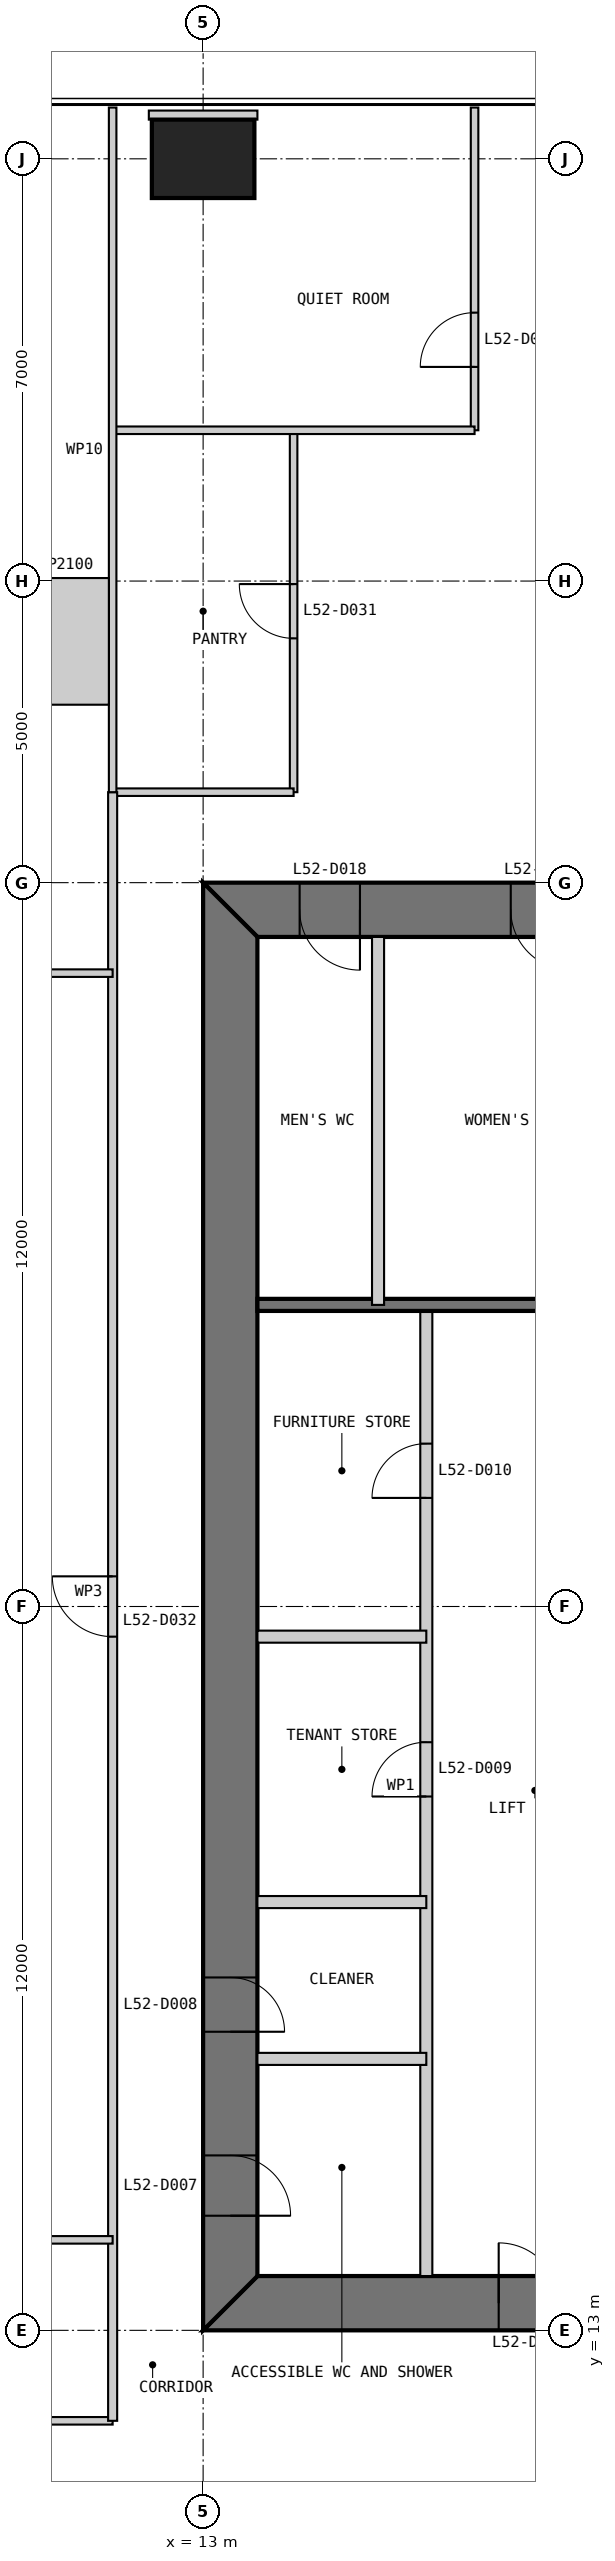
"""IFC4 building model, lengths in metres.
Left out: names, types, materials, properties, quantities, classifications, styles, units other than length and angle.
Written with IfcOpenShell. Run it as: python <this file> out.ifc"""

import sys

from ifc_helpers import new_model, si_unit, direction, frame, frame_2d, origin, origin_2d, place, context, subcontext, project, spatial, polyline, rectangle, outline, extrude, element, fill, save


model = new_model("IFC4")
c1 = context("Model", 3, precision=1e-05, world=origin(), true_north=direction((0.0, 1.0)))
c2 = subcontext(c1, "Body", "Model", "MODEL_VIEW")
j1 = project(units=[si_unit("LENGTHUNIT", "METRE"), si_unit("PLANEANGLEUNIT", "RADIAN")], contexts=[c1])
p1 = place(None, origin())
s1 = spatial("IfcSite", under=j1, at=p1, CompositionType="ELEMENT")
p2 = place(p1, origin())
s2 = spatial("IfcBuilding", under=s1, at=p2, CompositionType="ELEMENT")
p3 = place(p2, frame((0.0, 0.0, 221.8)))
s3 = spatial("IfcBuildingStorey", under=s2, at=p3, CompositionType="ELEMENT", Elevation=221.8)
p4 = place(p3, frame((13.0, 49.0, 0.0), z_axis=(0.0, 0.0, 1.0), x_axis=(1.0, 0.0, 0.0)))
e1 = element("IfcColumn", 1, at=p4, inside=s3, PredefinedType="COLUMN", context=c2, shape_type="SweptSolid", body=[
    extrude(rectangle(XDim=1.7, YDim=1.3, at=origin_2d()), origin(), (0.0, 0.0, 1.0), 4.0),
])
p5 = place(p3, frame((13.0, 13.45, 0.0), z_axis=(0.0, 0.0, 1.0), x_axis=(1.0, 0.0, 0.0)))
e2 = element("IfcWall", 2, at=p5, inside=s3, PredefinedType="SHEAR", context=c2, shape_type="SweptSolid", body=[
    extrude(outline(polyline([(0.0, -0.45), (24.0, -0.45), (23.1, 0.45), (0.9, 0.45), (0.0, -0.45)])), origin(), (0.0, 0.0, 1.0), 4.0),
])
p6 = place(p5, frame((4.9, 0.0, 0.0)))
e3 = element("IfcOpeningElement", 3, at=p6, cuts=e2, PredefinedType="OPENING", context=c2, shape_type="SweptSolid", body=[
    extrude(rectangle(XDim=1.0, YDim=2.2, at=frame_2d((0.5, 1.1))), frame((0.0, 0.46, 0.0), z_axis=(0.0, -1.0, 0.0), x_axis=(1.0, 0.0, 0.0)), (0.0, 0.0, 1.0), 0.92),
])
p7 = place(p5, frame((8.9, 0.0, 0.0)))
e4 = element("IfcOpeningElement", 4, at=p7, cuts=e2, PredefinedType="OPENING", context=c2, shape_type="SweptSolid", body=[
    extrude(rectangle(XDim=1.1, YDim=2.2, at=frame_2d((0.55, 1.1))), frame((0.0, 0.46, 0.0), z_axis=(0.0, -1.0, 0.0), x_axis=(1.0, 0.0, 0.0)), (0.0, 0.0, 1.0), 0.92),
])
p8 = place(p5, frame((15.05, 0.0, 0.0)))
e5 = element("IfcOpeningElement", 5, at=p8, cuts=e2, PredefinedType="OPENING", context=c2, shape_type="SweptSolid", body=[
    extrude(rectangle(XDim=0.9, YDim=2.2, at=frame_2d((0.45, 1.1))), frame((0.0, 0.46, 0.0), z_axis=(0.0, -1.0, 0.0), x_axis=(1.0, 0.0, 0.0)), (0.0, 0.0, 1.0), 0.92),
])
p9 = place(p5, frame((17.9, 0.0, 0.0)))
e6 = element("IfcOpeningElement", 6, at=p9, cuts=e2, PredefinedType="OPENING", context=c2, shape_type="SweptSolid", body=[
    extrude(rectangle(XDim=1.0, YDim=2.2, at=frame_2d((0.5, 1.1))), frame((0.0, 0.46, 0.0), z_axis=(0.0, -1.0, 0.0), x_axis=(1.0, 0.0, 0.0)), (0.0, 0.0, 1.0), 0.92),
])
p10 = place(p5, frame((21.4, 0.0, 0.0)))
e7 = element("IfcOpeningElement", 7, at=p10, cuts=e2, PredefinedType="OPENING", context=c2, shape_type="SweptSolid", body=[
    extrude(rectangle(XDim=1.0, YDim=2.2, at=frame_2d((0.5, 1.1))), frame((0.0, 0.46, 0.0), z_axis=(0.0, -1.0, 0.0), x_axis=(1.0, 0.0, 0.0)), (0.0, 0.0, 1.0), 0.92),
])
p11 = place(p3, frame((37.0, 36.55, 0.0), z_axis=(0.0, 0.0, 1.0), x_axis=(-1.0, 0.0, 0.0)))
e8 = element("IfcWall", 8, at=p11, inside=s3, PredefinedType="SHEAR", context=c2, shape_type="SweptSolid", body=[
    extrude(outline(polyline([(0.0, -0.45), (24.0, -0.45), (23.1, 0.45), (0.9, 0.45), (0.0, -0.45)])), origin(), (0.0, 0.0, 1.0), 4.0),
])
p12 = place(p11, frame((4.9, 0.0, 0.0)))
e9 = element("IfcOpeningElement", 9, at=p12, cuts=e8, PredefinedType="OPENING", context=c2, shape_type="SweptSolid", body=[
    extrude(rectangle(XDim=1.0, YDim=2.2, at=frame_2d((0.5, 1.1))), frame((0.0, 0.46, 0.0), z_axis=(0.0, -1.0, 0.0), x_axis=(1.0, 0.0, 0.0)), (0.0, 0.0, 1.0), 0.92),
])
p13 = place(p11, frame((8.9, 0.0, 0.0)))
e10 = element("IfcOpeningElement", 10, at=p13, cuts=e8, PredefinedType="OPENING", context=c2, shape_type="SweptSolid", body=[
    extrude(rectangle(XDim=1.1, YDim=2.2, at=frame_2d((0.55, 1.1))), frame((0.0, 0.46, 0.0), z_axis=(0.0, -1.0, 0.0), x_axis=(1.0, 0.0, 0.0)), (0.0, 0.0, 1.0), 0.92),
])
p14 = place(p11, frame((15.05, 0.0, 0.0)))
e11 = element("IfcOpeningElement", 11, at=p14, cuts=e8, PredefinedType="OPENING", context=c2, shape_type="SweptSolid", body=[
    extrude(rectangle(XDim=0.9, YDim=2.2, at=frame_2d((0.45, 1.1))), frame((0.0, 0.46, 0.0), z_axis=(0.0, -1.0, 0.0), x_axis=(1.0, 0.0, 0.0)), (0.0, 0.0, 1.0), 0.92),
])
p15 = place(p11, frame((17.9, 0.0, 0.0)))
e12 = element("IfcOpeningElement", 12, at=p15, cuts=e8, PredefinedType="OPENING", context=c2, shape_type="SweptSolid", body=[
    extrude(rectangle(XDim=1.0, YDim=2.2, at=frame_2d((0.5, 1.1))), frame((0.0, 0.46, 0.0), z_axis=(0.0, -1.0, 0.0), x_axis=(1.0, 0.0, 0.0)), (0.0, 0.0, 1.0), 0.92),
])
p16 = place(p11, frame((21.4, 0.0, 0.0)))
e13 = element("IfcOpeningElement", 13, at=p16, cuts=e8, PredefinedType="OPENING", context=c2, shape_type="SweptSolid", body=[
    extrude(rectangle(XDim=1.0, YDim=2.2, at=frame_2d((0.5, 1.1))), frame((0.0, 0.46, 0.0), z_axis=(0.0, -1.0, 0.0), x_axis=(1.0, 0.0, 0.0)), (0.0, 0.0, 1.0), 0.92),
])
p17 = place(p3, frame((13.45, 36.1, 0.0), z_axis=(0.0, 0.0, 1.0), x_axis=(0.0, -1.0, 0.0)))
e14 = element("IfcWall", 14, at=p17, inside=s3, PredefinedType="SHEAR", context=c2, shape_type="SweptSolid", body=[
    extrude(outline(polyline([(-0.9, -0.45), (23.1, -0.45), (22.2, 0.45), (0.0, 0.45), (-0.9, -0.45)])), origin(), (0.0, 0.0, 1.0), 4.0),
])
p18 = place(p17, frame((20.2, 0.0, 0.0)))
e15 = element("IfcOpeningElement", 15, at=p18, cuts=e14, PredefinedType="OPENING", context=c2, shape_type="SweptSolid", body=[
    extrude(rectangle(XDim=1.0, YDim=2.2, at=frame_2d((0.5, 1.1))), frame((0.0, 0.46, 0.0), z_axis=(0.0, -1.0, 0.0), x_axis=(1.0, 0.0, 0.0)), (0.0, 0.0, 1.0), 0.92),
])
p19 = place(p17, frame((17.25, 0.0, 0.0)))
e16 = element("IfcOpeningElement", 16, at=p19, cuts=e14, PredefinedType="OPENING", context=c2, shape_type="SweptSolid", body=[
    extrude(rectangle(XDim=0.9, YDim=2.2, at=frame_2d((0.45, 1.1))), frame((0.0, 0.46, 0.0), z_axis=(0.0, -1.0, 0.0), x_axis=(1.0, 0.0, 0.0)), (0.0, 0.0, 1.0), 0.92),
])
p20 = place(p3, frame((16.7, 13.9, 0.0), z_axis=(0.0, 0.0, 1.0), x_axis=(0.0, 1.0, 0.0)))
e17 = element("IfcWall", 17, at=p20, inside=s3, PredefinedType="PARTITIONING", context=c2, shape_type="SweptSolid", body=[
    extrude(rectangle(XDim=16.1, YDim=0.2, at=frame_2d((8.05, 0.0))), origin(), (0.0, 0.0, 1.0), 3.8),
])
p21 = place(p20, frame((7.95, 0.0, 0.0)))
e18 = element("IfcOpeningElement", 18, at=p21, cuts=e17, PredefinedType="OPENING", context=c2, shape_type="SweptSolid", body=[
    extrude(rectangle(XDim=0.9, YDim=2.2, at=frame_2d((0.45, 1.1))), frame((0.0, 0.11, 0.0), z_axis=(0.0, -1.0, 0.0), x_axis=(1.0, 0.0, 0.0)), (0.0, 0.0, 1.0), 0.22),
])
p22 = place(p20, frame((12.9, 0.0, 0.0)))
e19 = element("IfcOpeningElement", 19, at=p22, cuts=e17, PredefinedType="OPENING", context=c2, shape_type="SweptSolid", body=[
    extrude(rectangle(XDim=0.9, YDim=2.2, at=frame_2d((0.45, 1.1))), frame((0.0, 0.11, 0.0), z_axis=(0.0, -1.0, 0.0), x_axis=(1.0, 0.0, 0.0)), (0.0, 0.0, 1.0), 0.22),
])
for number, where, z_axis, x_axis in (
    (20, (13.9, 17.5, 0.0), (0.0, 0.0, 1.0), (1.0, 0.0, 0.0)),
    (21, (13.9, 20.1, 0.0), (0.0, 0.0, 1.0), (1.0, 0.0, 0.0)),
    (22, (13.9, 24.5, 0.0), (0.0, 0.0, 1.0), (1.0, 0.0, 0.0)),
):
    element("IfcWall", number, at=place(p3, frame(where, z_axis=z_axis, x_axis=x_axis)), inside=s3, PredefinedType="PARTITIONING", context=c2, shape_type="SweptSolid", body=[
        extrude(rectangle(XDim=2.8, YDim=0.2, at=frame_2d((1.4, 0.0))), origin(), (0.0, 0.0, 1.0), 3.8),
    ])
p23 = place(p3, frame((29.7, 30.0, 0.0), z_axis=(0.0, 0.0, 1.0), x_axis=(-1.0, 0.0, 0.0)))
e23 = element("IfcWall", 23, at=p23, inside=s3, PredefinedType="SOLIDWALL", context=c2, shape_type="SweptSolid", body=[
    extrude(rectangle(XDim=15.8, YDim=0.2, at=frame_2d((7.9, 0.0))), origin(), (0.0, 0.0, 1.0), 3.8),
])
p24 = place(p3, frame((15.9, 36.1, 0.0), z_axis=(0.0, 0.0, 1.0), x_axis=(0.0, -1.0, 0.0)))
e24 = element("IfcWall", 24, at=p24, inside=s3, PredefinedType="PARTITIONING", context=c2, shape_type="SweptSolid", body=[
    extrude(rectangle(XDim=6.1, YDim=0.2, at=frame_2d((3.05, 0.0))), origin(), (0.0, 0.0, 1.0), 3.8),
])
p25 = place(p3, frame((0.15, 11.5, 0.0), z_axis=(0.0, 0.0, 1.0), x_axis=(1.0, 0.0, 0.0)))
e25 = element("IfcWall", 25, at=p25, inside=s3, PredefinedType="PARTITIONING", context=c2, shape_type="SweptSolid", body=[
    extrude(rectangle(XDim=11.35, YDim=0.125, at=frame_2d((5.675, 0.0))), origin(), (0.0, 0.0, 1.0), 3.85),
])
p26 = place(p3, frame((17.5, 49.85, 0.0), z_axis=(0.0, 0.0, 1.0), x_axis=(0.0, -1.0, 0.0)))
e26 = element("IfcWall", 26, at=p26, inside=s3, PredefinedType="PARTITIONING", context=c2, shape_type="SweptSolid", body=[
    extrude(rectangle(XDim=5.35, YDim=0.125, at=frame_2d((2.675, 0.0))), origin(), (0.0, 0.0, 1.0), 3.85),
])
p27 = place(p26, frame((3.4, 0.0, 0.0)))
e27 = element("IfcOpeningElement", 27, at=p27, cuts=e26, PredefinedType="OPENING", context=c2, shape_type="SweptSolid", body=[
    extrude(rectangle(XDim=0.9, YDim=2.2, at=frame_2d((0.45, 1.1))), frame((0.0, 0.073, 0.0), z_axis=(0.0, -1.0, 0.0), x_axis=(1.0, 0.0, 0.0)), (0.0, 0.0, 1.0), 0.145),
])
p28 = place(p3, frame((14.5, 44.5, 0.0), z_axis=(0.0, 0.0, 1.0), x_axis=(0.0, -1.0, 0.0)))
e28 = element("IfcWall", 28, at=p28, inside=s3, PredefinedType="PARTITIONING", context=c2, shape_type="SweptSolid", body=[
    extrude(rectangle(XDim=6.0, YDim=0.125, at=frame_2d((3.0, 0.0))), origin(), (0.0, 0.0, 1.0), 3.85),
])
p29 = place(p28, frame((2.55, 0.0, 0.0)))
e29 = element("IfcOpeningElement", 29, at=p29, cuts=e28, PredefinedType="OPENING", context=c2, shape_type="SweptSolid", body=[
    extrude(rectangle(XDim=0.9, YDim=2.2, at=frame_2d((0.45, 1.1))), frame((0.0, 0.073, 0.0), z_axis=(0.0, -1.0, 0.0), x_axis=(1.0, 0.0, 0.0)), (0.0, 0.0, 1.0), 0.145),
])
p30 = place(p3, frame((17.5, 44.5, 0.0), z_axis=(0.0, 0.0, 1.0), x_axis=(-1.0, 0.0, 0.0)))
e30 = element("IfcWall", 30, at=p30, inside=s3, PredefinedType="PARTITIONING", context=c2, shape_type="SweptSolid", body=[
    extrude(rectangle(XDim=6.0, YDim=0.125, at=frame_2d((3.0, 0.0))), origin(), (0.0, 0.0, 1.0), 3.85),
])
p31 = place(p3, frame((14.5, 38.5, 0.0), z_axis=(0.0, 0.0, 1.0), x_axis=(-1.0, 0.0, 0.0)))
e31 = element("IfcWall", 31, at=p31, inside=s3, PredefinedType="PARTITIONING", context=c2, shape_type="SweptSolid", body=[
    extrude(rectangle(XDim=3.0, YDim=0.125, at=frame_2d((1.5, 0.0))), origin(), (0.0, 0.0, 1.0), 3.85),
])
p32 = place(p3, frame((11.5, 38.5, 0.0), z_axis=(0.0, 0.0, 1.0), x_axis=(0.0, -1.0, 0.0)))
e32 = element("IfcWall", 32, at=p32, inside=s3, PredefinedType="PARTITIONING", context=c2, shape_type="SweptSolid", body=[
    extrude(rectangle(XDim=27.0, YDim=0.15, at=frame_2d((13.5, 0.0))), origin(), (0.0, 0.0, 1.0), 3.85),
])
p33 = place(p32, frame((13.0, 0.0, 0.0)))
e33 = element("IfcOpeningElement", 33, at=p33, cuts=e32, PredefinedType="OPENING", context=c2, shape_type="SweptSolid", body=[
    extrude(rectangle(XDim=1.0, YDim=2.2, at=frame_2d((0.5, 1.1))), frame((0.0, 0.085, 0.0), z_axis=(0.0, -1.0, 0.0), x_axis=(1.0, 0.0, 0.0)), (0.0, 0.0, 1.0), 0.17),
])
p34 = place(p3, frame((11.5, 49.85, 0.0), z_axis=(0.0, 0.0, 1.0), x_axis=(0.0, -1.0, 0.0)))
e34 = element("IfcWall", 34, at=p34, inside=s3, PredefinedType="PARTITIONING", context=c2, shape_type="SweptSolid", body=[
    extrude(rectangle(XDim=11.35, YDim=0.125, at=frame_2d((5.675, 0.0))), origin(), (0.0, 0.0, 1.0), 3.85),
])
p35 = place(p3, frame((0.15, 35.5, 0.0), z_axis=(0.0, 0.0, 1.0), x_axis=(1.0, 0.0, 0.0)))
e35 = element("IfcWall", 35, at=p35, inside=s3, PredefinedType="PARTITIONING", context=c2, shape_type="SweptSolid", body=[
    extrude(rectangle(XDim=11.35, YDim=0.125, at=frame_2d((5.675, 0.0))), origin(), (0.0, 0.0, 1.0), 3.85),
])
p36 = place(p35, frame((7.9, 0.0, 0.0)))
e36 = element("IfcOpeningElement", 36, at=p36, cuts=e35, PredefinedType="OPENING", context=c2, shape_type="SweptSolid", body=[
    extrude(rectangle(XDim=0.9, YDim=2.2, at=frame_2d((0.45, 1.1))), frame((0.0, 0.073, 0.0), z_axis=(0.0, -1.0, 0.0), x_axis=(1.0, 0.0, 0.0)), (0.0, 0.0, 1.0), 0.145),
])
p37 = place(p3, frame((5.5, 14.5, 0.0), z_axis=(0.0, 0.0, 1.0), x_axis=(1.0, 0.0, 0.0)))
e37 = element("IfcWall", 37, at=p37, inside=s3, PredefinedType="PARTITIONING", context=c2, shape_type="SweptSolid", body=[
    extrude(rectangle(XDim=6.0, YDim=0.125, at=frame_2d((3.0, 0.0))), origin(), (0.0, 0.0, 1.0), 3.85),
])
p38 = place(p37, frame((2.55, 0.0, 0.0)))
e38 = element("IfcOpeningElement", 38, at=p38, cuts=e37, PredefinedType="OPENING", context=c2, shape_type="SweptSolid", body=[
    extrude(rectangle(XDim=0.9, YDim=2.2, at=frame_2d((0.45, 1.1))), frame((0.0, 0.073, 0.0), z_axis=(0.0, -1.0, 0.0), x_axis=(1.0, 0.0, 0.0)), (0.0, 0.0, 1.0), 0.145),
])
p39 = place(p3, frame((13.0, 49.8, 0.0), z_axis=(0.0, 0.0, 1.0), x_axis=(0.0, -1.0, 0.0)))
e39 = element("IfcWall", 39, at=p39, inside=s3, PredefinedType="PARTITIONING", context=c2, shape_type="SweptSolid", body=[
    extrude(rectangle(XDim=0.15, YDim=1.8, at=frame_2d((0.075, 0.0))), origin(), (0.0, 0.0, 1.0), 3.85),
])
p40 = place(p3, frame((11.438, 41.0, 0.0), z_axis=(0.0, 0.0, 1.0), x_axis=(-1.0, 0.0, 0.0)))
e40 = element("IfcWall", 40, at=p40, inside=s3, PredefinedType="PARTITIONING", context=c2, shape_type="SweptSolid", body=[
    extrude(rectangle(XDim=1.438, YDim=2.1, at=frame_2d((0.719, 0.0))), origin(), (0.0, 0.0, 1.0), 3.85),
])
p41 = place(p6, origin())
e41 = element("IfcDoor", 41, at=p41, inside=s3, OperationType="SINGLE_SWING_LEFT", PredefinedType="DOOR", context=c2, shape_type="SweptSolid", body=[
    extrude(rectangle(XDim=1.0, YDim=2.2, at=frame_2d((0.5, 1.1))), frame((0.0, 0.025, 0.0), z_axis=(0.0, -1.0, 0.0), x_axis=(1.0, 0.0, 0.0)), (0.0, 0.0, 1.0), 0.05),
    extrude(outline(polyline([(0.0, 0.0), (0.04, 0.0), (0.04, 2.16), (0.96, 2.16), (0.96, 0.0), (1.0, 0.0), (1.0, 2.2), (0.0, 2.2), (0.0, 0.0)])), frame((0.0, 0.3, 0.0), z_axis=(0.0, -1.0, 0.0), x_axis=(1.0, 0.0, 0.0)), (0.0, 0.0, 1.0), 0.6),
])
fill(e3, e41)
p42 = place(p18, origin())
e42 = element("IfcDoor", 42, at=p42, inside=s3, OperationType="SINGLE_SWING_RIGHT", PredefinedType="DOOR", context=c2, shape_type="SweptSolid", body=[
    extrude(rectangle(XDim=1.0, YDim=2.2, at=frame_2d((0.5, 1.1))), frame((0.0, 0.025, 0.0), z_axis=(0.0, -1.0, 0.0), x_axis=(1.0, 0.0, 0.0)), (0.0, 0.0, 1.0), 0.05),
    extrude(outline(polyline([(0.0, 0.0), (0.04, 0.0), (0.04, 2.16), (0.96, 2.16), (0.96, 0.0), (1.0, 0.0), (1.0, 2.2), (0.0, 2.2), (0.0, 0.0)])), frame((0.0, 0.3, 0.0), z_axis=(0.0, -1.0, 0.0), x_axis=(1.0, 0.0, 0.0)), (0.0, 0.0, 1.0), 0.6),
])
fill(e15, e42)
p43 = place(p19, origin())
e43 = element("IfcDoor", 43, at=p43, inside=s3, OperationType="SINGLE_SWING_RIGHT", PredefinedType="DOOR", context=c2, shape_type="SweptSolid", body=[
    extrude(rectangle(XDim=0.9, YDim=2.2, at=frame_2d((0.45, 1.1))), frame((0.0, 0.025, 0.0), z_axis=(0.0, -1.0, 0.0), x_axis=(1.0, 0.0, 0.0)), (0.0, 0.0, 1.0), 0.05),
    extrude(outline(polyline([(0.0, 0.0), (0.04, 0.0), (0.04, 2.16), (0.86, 2.16), (0.86, 0.0), (0.9, 0.0), (0.9, 2.2), (0.0, 2.2), (0.0, 0.0)])), frame((0.0, 0.3, 0.0), z_axis=(0.0, -1.0, 0.0), x_axis=(1.0, 0.0, 0.0)), (0.0, 0.0, 1.0), 0.6),
])
fill(e16, e43)
p44 = place(p21, origin())
e44 = element("IfcDoor", 44, at=p44, inside=s3, OperationType="SINGLE_SWING_LEFT", PredefinedType="DOOR", context=c2, shape_type="SweptSolid", body=[
    extrude(rectangle(XDim=0.9, YDim=2.2, at=frame_2d((0.45, 1.1))), frame((0.0, 0.025, 0.0), z_axis=(0.0, -1.0, 0.0), x_axis=(1.0, 0.0, 0.0)), (0.0, 0.0, 1.0), 0.05),
])
fill(e18, e44)
p45 = place(p22, origin())
e45 = element("IfcDoor", 45, at=p45, inside=s3, OperationType="SINGLE_SWING_LEFT", PredefinedType="DOOR", context=c2, shape_type="SweptSolid", body=[
    extrude(rectangle(XDim=0.9, YDim=2.2, at=frame_2d((0.45, 1.1))), frame((0.0, 0.025, 0.0), z_axis=(0.0, -1.0, 0.0), x_axis=(1.0, 0.0, 0.0)), (0.0, 0.0, 1.0), 0.05),
])
fill(e19, e45)
p46 = place(p15, origin())
e46 = element("IfcDoor", 46, at=p46, inside=s3, OperationType="SINGLE_SWING_LEFT", PredefinedType="DOOR", context=c2, shape_type="SweptSolid", body=[
    extrude(rectangle(XDim=1.0, YDim=2.2, at=frame_2d((0.5, 1.1))), frame((0.0, 0.025, 0.0), z_axis=(0.0, -1.0, 0.0), x_axis=(1.0, 0.0, 0.0)), (0.0, 0.0, 1.0), 0.05),
    extrude(outline(polyline([(0.0, 0.0), (0.04, 0.0), (0.04, 2.16), (0.96, 2.16), (0.96, 0.0), (1.0, 0.0), (1.0, 2.2), (0.0, 2.2), (0.0, 0.0)])), frame((0.0, 0.3, 0.0), z_axis=(0.0, -1.0, 0.0), x_axis=(1.0, 0.0, 0.0)), (0.0, 0.0, 1.0), 0.6),
])
fill(e12, e46)
p47 = place(p16, origin())
e47 = element("IfcDoor", 47, at=p47, inside=s3, OperationType="SINGLE_SWING_LEFT", PredefinedType="DOOR", context=c2, shape_type="SweptSolid", body=[
    extrude(rectangle(XDim=1.0, YDim=2.2, at=frame_2d((0.5, 1.1))), frame((0.0, 0.025, 0.0), z_axis=(0.0, -1.0, 0.0), x_axis=(1.0, 0.0, 0.0)), (0.0, 0.0, 1.0), 0.05),
    extrude(outline(polyline([(0.0, 0.0), (0.04, 0.0), (0.04, 2.16), (0.96, 2.16), (0.96, 0.0), (1.0, 0.0), (1.0, 2.2), (0.0, 2.2), (0.0, 0.0)])), frame((0.0, 0.3, 0.0), z_axis=(0.0, -1.0, 0.0), x_axis=(1.0, 0.0, 0.0)), (0.0, 0.0, 1.0), 0.6),
])
fill(e13, e47)
p48 = place(p27, frame((0.9, 0.0, 0.0), z_axis=(0.0, 0.0, 1.0), x_axis=(-1.0, 0.0, 0.0)))
e48 = element("IfcDoor", 48, at=p48, inside=s3, OperationType="SINGLE_SWING_LEFT", PredefinedType="DOOR", context=c2, shape_type="SweptSolid", body=[
    extrude(rectangle(XDim=0.9, YDim=2.2, at=frame_2d((0.45, 1.1))), frame((0.0, 0.025, 0.0), z_axis=(0.0, -1.0, 0.0), x_axis=(1.0, 0.0, 0.0)), (0.0, 0.0, 1.0), 0.05),
])
fill(e27, e48)
p49 = place(p29, frame((0.9, 0.0, 0.0), z_axis=(0.0, 0.0, 1.0), x_axis=(-1.0, 0.0, 0.0)))
e49 = element("IfcDoor", 49, at=p49, inside=s3, OperationType="SINGLE_SWING_RIGHT", PredefinedType="DOOR", context=c2, shape_type="SweptSolid", body=[
    extrude(rectangle(XDim=0.9, YDim=2.2, at=frame_2d((0.45, 1.1))), frame((0.0, 0.025, 0.0), z_axis=(0.0, -1.0, 0.0), x_axis=(1.0, 0.0, 0.0)), (0.0, 0.0, 1.0), 0.05),
])
fill(e29, e49)
p50 = place(p33, frame((1.0, 0.0, 0.0), z_axis=(0.0, 0.0, 1.0), x_axis=(-1.0, 0.0, 0.0)))
e50 = element("IfcDoor", 50, at=p50, inside=s3, OperationType="SINGLE_SWING_RIGHT", PredefinedType="DOOR", context=c2, shape_type="SweptSolid", body=[
    extrude(rectangle(XDim=1.0, YDim=2.2, at=frame_2d((0.5, 1.1))), frame((0.0, 0.025, 0.0), z_axis=(0.0, -1.0, 0.0), x_axis=(1.0, 0.0, 0.0)), (0.0, 0.0, 1.0), 0.05),
])
fill(e33, e50)
save(model, sys.argv[1])
